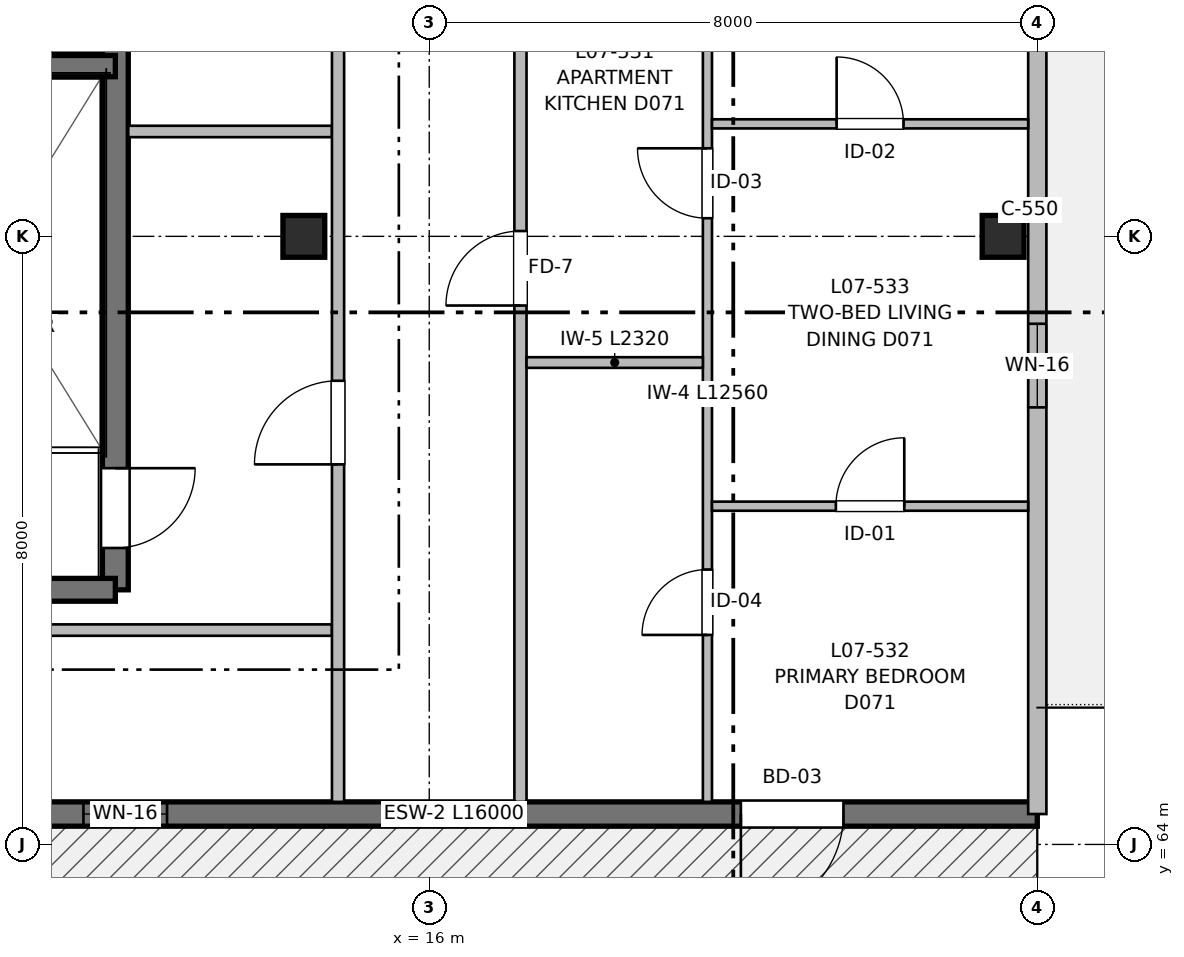
"""IFC4 building model, lengths in metres.
Left out: names, types, materials, properties, quantities, classifications, styles, units other than length and angle.
Written with IfcOpenShell. Run it as: python <this file> out.ifc"""

import sys

from ifc_helpers import new_model, si_unit, direction, frame, frame_2d, origin, origin_2d, place, context, subcontext, project, spatial, rectangle, extrude, element, fill, save


model = new_model("IFC4")
c1 = context("Model", 3, precision=1e-05, world=origin(), true_north=direction((0.0, 1.0)))
c2 = subcontext(c1, "Body", "Model", "MODEL_VIEW")
j1 = project(units=[si_unit("LENGTHUNIT", "METRE"), si_unit("PLANEANGLEUNIT", "RADIAN")], contexts=[c1])
p1 = place(None, origin())
s1 = spatial("IfcSite", under=j1, at=p1, CompositionType="ELEMENT")
p2 = place(p1, origin())
s2 = spatial("IfcBuilding", under=s1, at=p2, CompositionType="ELEMENT")
p3 = place(p2, frame((0.0, 0.0, 23.36)))
s3 = spatial("IfcBuildingStorey", under=s2, at=p3, CompositionType="ELEMENT", Elevation=23.36)
for number, where, z_axis, x_axis in (
    (1, (14.35, 72.0, 0.0), (0.0, 0.0, 1.0), (1.0, 0.0, 0.0)),
    (2, (23.55, 72.0, 0.0), (0.0, 0.0, 1.0), (1.0, 0.0, 0.0)),
):
    element("IfcColumn", number, at=place(p3, frame(where, z_axis=z_axis, x_axis=x_axis)), inside=s3, PredefinedType="COLUMN", context=c2, shape_type="SweptSolid", body=[
        extrude(rectangle(XDim=0.55, YDim=0.55, at=origin_2d()), origin(), (0.0, 0.0, 1.0), 3.2),
    ])
p4 = place(p3, frame((11.87, 79.8, 0.0), z_axis=(0.0, 0.0, 1.0), x_axis=(0.0, -1.0, 0.0)))
e3 = element("IfcWall", 3, at=p4, inside=s3, PredefinedType="SHEAR", context=c2, shape_type="SweptSolid", body=[
    extrude(rectangle(XDim=12.45, YDim=0.34, at=frame_2d((6.225, 0.0))), origin(), (0.0, 0.0, 1.0), 3.2),
])
p5 = place(p4, frame((10.85, 0.0, 0.0)))
e4 = element("IfcOpeningElement", 4, at=p5, cuts=e3, PredefinedType="OPENING", context=c2, shape_type="SweptSolid", body=[
    extrude(rectangle(XDim=1.05, YDim=2.15, at=frame_2d((0.525, 1.075))), frame((0.0, 0.18, 0.0), z_axis=(0.0, -1.0, 0.0), x_axis=(1.0, 0.0, 0.0)), (0.0, 0.0, 1.0), 0.36),
])
p6 = place(p3, frame((11.87, 67.35, 0.0), z_axis=(0.0, 0.0, 1.0), x_axis=(-1.0, 0.0, 0.0)))
e5 = element("IfcWall", 5, at=p6, inside=s3, PredefinedType="SHEAR", context=c2, shape_type="SweptSolid", body=[
    extrude(rectangle(XDim=3.41, YDim=0.3, at=frame_2d((1.705, 0.0))), origin(), (0.0, 0.0, 1.0), 3.2),
])
p7 = place(p3, frame((8.46, 74.24, 0.0), z_axis=(0.0, 0.0, 1.0), x_axis=(1.0, 0.0, 0.0)))
e6 = element("IfcWall", 6, at=p7, inside=s3, PredefinedType="SHEAR", context=c2, shape_type="SweptSolid", body=[
    extrude(rectangle(XDim=3.41, YDim=0.28, at=frame_2d((1.705, 0.0))), origin(), (0.0, 0.0, 1.0), 3.2),
])
p8 = place(p3, frame((24.0, 64.4, 0.0), z_axis=(0.0, 0.0, 1.0), x_axis=(-1.0, 0.0, 0.0)))
e7 = element("IfcWall", 7, at=p8, inside=s3, PredefinedType="SHEAR", context=c2, shape_type="SweptSolid", body=[
    extrude(rectangle(XDim=16.0, YDim=0.32, at=frame_2d((8.0, 0.0))), origin(), (0.0, 0.0, 1.0), 2.98),
])
p9 = place(p8, frame((2.55, 0.0, 0.0)))
e8 = element("IfcOpeningElement", 8, at=p9, cuts=e7, PredefinedType="OPENING", context=c2, shape_type="SweptSolid", body=[
    extrude(rectangle(XDim=1.35, YDim=2.2, at=frame_2d((0.675, 1.1))), frame((0.0, 0.17, 0.0), z_axis=(0.0, -1.0, 0.0), x_axis=(1.0, 0.0, 0.0)), (0.0, 0.0, 1.0), 0.34),
])
p10 = place(p8, frame((11.45, 0.0, 0.62)))
e9 = element("IfcOpeningElement", 9, at=p10, cuts=e7, PredefinedType="OPENING", context=c2, shape_type="SweptSolid", body=[
    extrude(rectangle(XDim=1.1, YDim=1.6, at=frame_2d((0.55, 0.8))), frame((0.0, 0.17, 0.0), z_axis=(0.0, -1.0, 0.0), x_axis=(1.0, 0.0, 0.0)), (0.0, 0.0, 1.0), 0.34),
])
p11 = place(p3, frame((24.0, 88.0, 0.0), z_axis=(0.0, 0.0, 1.0), x_axis=(0.0, -1.0, 0.0)))
e10 = element("IfcWall", 10, at=p11, inside=s3, PredefinedType="SOLIDWALL", context=c2, shape_type="SweptSolid", body=[
    extrude(rectangle(XDim=23.6, YDim=0.24, at=frame_2d((11.8, 0.0))), origin(), (0.0, 0.0, 1.0), 2.98),
])
p12 = place(p11, frame((5.3, 0.0, 0.0)))
e11 = element("IfcOpeningElement", 11, at=p12, cuts=e10, PredefinedType="OPENING", context=c2, shape_type="SweptSolid", body=[
    extrude(rectangle(XDim=1.2, YDim=2.2, at=frame_2d((0.6, 1.1))), frame((0.0, 0.13, 0.0), z_axis=(0.0, -1.0, 0.0), x_axis=(1.0, 0.0, 0.0)), (0.0, 0.0, 1.0), 0.26),
])
p13 = place(p11, frame((7.2, 0.0, 0.67)))
e12 = element("IfcOpeningElement", 12, at=p13, cuts=e10, PredefinedType="OPENING", context=c2, shape_type="SweptSolid", body=[
    extrude(rectangle(XDim=2.6, YDim=1.55, at=frame_2d((1.3, 0.775))), frame((0.0, 0.13, 0.0), z_axis=(0.0, -1.0, 0.0), x_axis=(1.0, 0.0, 0.0)), (0.0, 0.0, 1.0), 0.26),
])
p14 = place(p11, frame((17.15, 0.0, 0.62)))
e13 = element("IfcOpeningElement", 13, at=p14, cuts=e10, PredefinedType="OPENING", context=c2, shape_type="SweptSolid", body=[
    extrude(rectangle(XDim=1.1, YDim=1.6, at=frame_2d((0.55, 0.8))), frame((0.0, 0.13, 0.0), z_axis=(0.0, -1.0, 0.0), x_axis=(1.0, 0.0, 0.0)), (0.0, 0.0, 1.0), 0.26),
])
p15 = place(p11, frame((11.925, 0.0, 0.82)))
e14 = element("IfcOpeningElement", 14, at=p15, cuts=e10, PredefinedType="OPENING", context=c2, shape_type="SweptSolid", body=[
    extrude(rectangle(XDim=1.5, YDim=1.4, at=frame_2d((0.75, 0.7))), frame((0.0, 0.13, 0.0), z_axis=(0.0, -1.0, 0.0), x_axis=(1.0, 0.0, 0.0)), (0.0, 0.0, 1.0), 0.26),
])
p16 = place(p3, frame((8.12, 66.82, 0.0), z_axis=(0.0, 0.0, 1.0), x_axis=(1.0, 0.0, 0.0)))
e15 = element("IfcWall", 15, at=p16, inside=s3, PredefinedType="PARTITIONING", context=c2, shape_type="SweptSolid", body=[
    extrude(rectangle(XDim=6.6, YDim=0.15, at=frame_2d((3.3, 0.0))), origin(), (0.0, 0.0, 1.0), 2.935),
])
p17 = place(p3, frame((12.04, 73.38, 0.0), z_axis=(0.0, 0.0, 1.0), x_axis=(1.0, 0.0, 0.0)))
e16 = element("IfcWall", 16, at=p17, inside=s3, PredefinedType="PARTITIONING", context=c2, shape_type="SweptSolid", body=[
    extrude(rectangle(XDim=2.68, YDim=0.15, at=frame_2d((1.34, 0.0))), origin(), (0.0, 0.0, 1.0), 2.935),
])
p18 = place(p3, frame((14.8, 64.56, 0.0), z_axis=(0.0, 0.0, 1.0), x_axis=(0.0, 1.0, 0.0)))
e17 = element("IfcWall", 17, at=p18, inside=s3, PredefinedType="PARTITIONING", context=c2, shape_type="SweptSolid", body=[
    extrude(rectangle(XDim=42.24, YDim=0.16, at=frame_2d((21.12, 0.0))), origin(), (0.0, 0.0, 1.0), 2.935),
])
p19 = place(p18, frame((4.44, 0.0, 0.0)))
e18 = element("IfcOpeningElement", 18, at=p19, cuts=e17, PredefinedType="OPENING", context=c2, shape_type="SweptSolid", body=[
    extrude(rectangle(XDim=1.1, YDim=2.15, at=frame_2d((0.55, 1.075))), frame((0.0, 0.09, 0.0), z_axis=(0.0, -1.0, 0.0), x_axis=(1.0, 0.0, 0.0)), (0.0, 0.0, 1.0), 0.18),
])
p20 = place(p18, frame((10.84, 0.0, 0.0)))
e19 = element("IfcOpeningElement", 19, at=p20, cuts=e17, PredefinedType="OPENING", context=c2, shape_type="SweptSolid", body=[
    extrude(rectangle(XDim=1.6, YDim=2.15, at=frame_2d((0.8, 1.075))), frame((0.0, 0.09, 0.0), z_axis=(0.0, -1.0, 0.0), x_axis=(1.0, 0.0, 0.0)), (0.0, 0.0, 1.0), 0.18),
])
p21 = place(p18, frame((24.345, 0.0, 0.0)))
e20 = element("IfcOpeningElement", 20, at=p21, cuts=e17, PredefinedType="OPENING", context=c2, shape_type="SweptSolid", body=[
    extrude(rectangle(XDim=0.98, YDim=2.15, at=frame_2d((0.49, 1.075))), frame((0.0, 0.09, 0.0), z_axis=(0.0, -1.0, 0.0), x_axis=(1.0, 0.0, 0.0)), (0.0, 0.0, 1.0), 0.18),
])
p22 = place(p18, frame((32.555, 0.0, 0.0)))
e21 = element("IfcOpeningElement", 21, at=p22, cuts=e17, PredefinedType="OPENING", context=c2, shape_type="SweptSolid", body=[
    extrude(rectangle(XDim=0.98, YDim=2.15, at=frame_2d((0.49, 1.075))), frame((0.0, 0.09, 0.0), z_axis=(0.0, -1.0, 0.0), x_axis=(1.0, 0.0, 0.0)), (0.0, 0.0, 1.0), 0.18),
])
p23 = place(p3, frame((17.2, 64.56, 0.0), z_axis=(0.0, 0.0, 1.0), x_axis=(0.0, 1.0, 0.0)))
e22 = element("IfcWall", 22, at=p23, inside=s3, PredefinedType="PARTITIONING", context=c2, shape_type="SweptSolid", body=[
    extrude(rectangle(XDim=42.24, YDim=0.16, at=frame_2d((21.12, 0.0))), origin(), (0.0, 0.0, 1.0), 2.935),
])
p24 = place(p23, frame((6.53, 0.0, 0.0)))
e23 = element("IfcOpeningElement", 23, at=p24, cuts=e22, PredefinedType="OPENING", context=c2, shape_type="SweptSolid", body=[
    extrude(rectangle(XDim=0.98, YDim=2.15, at=frame_2d((0.49, 1.075))), frame((0.0, 0.09, 0.0), z_axis=(0.0, -1.0, 0.0), x_axis=(1.0, 0.0, 0.0)), (0.0, 0.0, 1.0), 0.18),
])
p25 = place(p23, frame((18.84, 0.0, 0.0)))
e24 = element("IfcOpeningElement", 24, at=p25, cuts=e22, PredefinedType="OPENING", context=c2, shape_type="SweptSolid", body=[
    extrude(rectangle(XDim=1.02, YDim=2.15, at=frame_2d((0.51, 1.075))), frame((0.0, 0.09, 0.0), z_axis=(0.0, -1.0, 0.0), x_axis=(1.0, 0.0, 0.0)), (0.0, 0.0, 1.0), 0.18),
])
p26 = place(p23, frame((29.86, 0.0, 0.0)))
e25 = element("IfcOpeningElement", 25, at=p26, cuts=e22, PredefinedType="OPENING", context=c2, shape_type="SweptSolid", body=[
    extrude(rectangle(XDim=0.98, YDim=2.15, at=frame_2d((0.49, 1.075))), frame((0.0, 0.09, 0.0), z_axis=(0.0, -1.0, 0.0), x_axis=(1.0, 0.0, 0.0)), (0.0, 0.0, 1.0), 0.18),
])
p27 = place(p23, frame((38.86, 0.0, 0.0)))
e26 = element("IfcOpeningElement", 26, at=p27, cuts=e22, PredefinedType="OPENING", context=c2, shape_type="SweptSolid", body=[
    extrude(rectangle(XDim=0.98, YDim=2.15, at=frame_2d((0.49, 1.075))), frame((0.0, 0.09, 0.0), z_axis=(0.0, -1.0, 0.0), x_axis=(1.0, 0.0, 0.0)), (0.0, 0.0, 1.0), 0.18),
])
p28 = place(p3, frame((19.66, 64.56, 0.0), z_axis=(0.0, 0.0, 1.0), x_axis=(0.0, 1.0, 0.0)))
e27 = element("IfcWall", 27, at=p28, inside=s3, PredefinedType="PARTITIONING", context=c2, shape_type="SweptSolid", body=[
    extrude(rectangle(XDim=12.56, YDim=0.12, at=frame_2d((6.28, 0.0))), origin(), (0.0, 0.0, 1.0), 2.935),
])
p29 = place(p28, frame((2.196, 0.0, 0.0)))
e28 = element("IfcOpeningElement", 28, at=p29, cuts=e27, PredefinedType="OPENING", context=c2, shape_type="SweptSolid", body=[
    extrude(rectangle(XDim=0.86, YDim=2.1, at=frame_2d((0.43, 1.05))), frame((0.0, 0.07, 0.0), z_axis=(0.0, -1.0, 0.0), x_axis=(1.0, 0.0, 0.0)), (0.0, 0.0, 1.0), 0.14),
])
p30 = place(p28, frame((7.678, 0.0, 0.0)))
e29 = element("IfcOpeningElement", 29, at=p30, cuts=e27, PredefinedType="OPENING", context=c2, shape_type="SweptSolid", body=[
    extrude(rectangle(XDim=0.92, YDim=2.1, at=frame_2d((0.46, 1.05))), frame((0.0, 0.07, 0.0), z_axis=(0.0, -1.0, 0.0), x_axis=(1.0, 0.0, 0.0)), (0.0, 0.0, 1.0), 0.14),
])
p31 = place(p3, frame((17.28, 70.34, 0.0), z_axis=(0.0, 0.0, 1.0), x_axis=(1.0, 0.0, 0.0)))
e30 = element("IfcWall", 30, at=p31, inside=s3, PredefinedType="PARTITIONING", context=c2, shape_type="SweptSolid", body=[
    extrude(rectangle(XDim=2.32, YDim=0.14, at=frame_2d((1.16, 0.0))), origin(), (0.0, 0.0, 1.0), 2.935),
])
p32 = place(p3, frame((19.72, 68.45, 0.0), z_axis=(0.0, 0.0, 1.0), x_axis=(1.0, 0.0, 0.0)))
e31 = element("IfcWall", 31, at=p32, inside=s3, PredefinedType="PARTITIONING", context=c2, shape_type="SweptSolid", body=[
    extrude(rectangle(XDim=4.16, YDim=0.12, at=frame_2d((2.08, 0.0))), origin(), (0.0, 0.0, 1.0), 2.935),
])
p33 = place(p32, frame((1.63, 0.0, 0.0)))
e32 = element("IfcOpeningElement", 32, at=p33, cuts=e31, PredefinedType="OPENING", context=c2, shape_type="SweptSolid", body=[
    extrude(rectangle(XDim=0.9, YDim=2.1, at=frame_2d((0.45, 1.05))), frame((0.0, 0.07, 0.0), z_axis=(0.0, -1.0, 0.0), x_axis=(1.0, 0.0, 0.0)), (0.0, 0.0, 1.0), 0.14),
])
p34 = place(p3, frame((19.72, 73.48, 0.0), z_axis=(0.0, 0.0, 1.0), x_axis=(1.0, 0.0, 0.0)))
e33 = element("IfcWall", 33, at=p34, inside=s3, PredefinedType="PARTITIONING", context=c2, shape_type="SweptSolid", body=[
    extrude(rectangle(XDim=4.16, YDim=0.12, at=frame_2d((2.08, 0.0))), origin(), (0.0, 0.0, 1.0), 2.935),
])
p35 = place(p34, frame((1.64, 0.0, 0.0)))
e34 = element("IfcOpeningElement", 34, at=p35, cuts=e33, PredefinedType="OPENING", context=c2, shape_type="SweptSolid", body=[
    extrude(rectangle(XDim=0.88, YDim=2.1, at=frame_2d((0.44, 1.05))), frame((0.0, 0.07, 0.0), z_axis=(0.0, -1.0, 0.0), x_axis=(1.0, 0.0, 0.0)), (0.0, 0.0, 1.0), 0.14),
])
p36 = place(p5, origin())
e35 = element("IfcDoor", 35, at=p36, inside=s3, OperationType="SINGLE_SWING_LEFT", PredefinedType="DOOR", context=c2, shape_type="SweptSolid", body=[
    extrude(rectangle(XDim=1.05, YDim=2.15, at=frame_2d((0.525, 1.075))), frame((0.0, 0.025, 0.0), z_axis=(0.0, -1.0, 0.0), x_axis=(1.0, 0.0, 0.0)), (0.0, 0.0, 1.0), 0.05),
])
fill(e4, e35)
p37 = place(p9, origin())
e36 = element("IfcDoor", 36, at=p37, inside=s3, OperationType="SINGLE_SWING_RIGHT", PredefinedType="DOOR", context=c2, shape_type="SweptSolid", body=[
    extrude(rectangle(XDim=1.35, YDim=2.2, at=frame_2d((0.675, 1.1))), frame((0.0, 0.025, 0.0), z_axis=(0.0, -1.0, 0.0), x_axis=(1.0, 0.0, 0.0)), (0.0, 0.0, 1.0), 0.05),
])
fill(e8, e36)
p38 = place(p10, origin())
e37 = element("IfcWindow", 37, at=p38, inside=s3, PartitioningType="SINGLE_PANEL", PredefinedType="WINDOW", context=c2, shape_type="SweptSolid", body=[
    extrude(rectangle(XDim=1.1, YDim=1.6, at=frame_2d((0.55, 0.8))), frame((0.0, 0.03, 0.0), z_axis=(0.0, -1.0, 0.0), x_axis=(1.0, 0.0, 0.0)), (0.0, 0.0, 1.0), 0.06),
])
fill(e9, e37)
p39 = place(p14, origin())
e38 = element("IfcWindow", 38, at=p39, inside=s3, PartitioningType="SINGLE_PANEL", PredefinedType="WINDOW", context=c2, shape_type="SweptSolid", body=[
    extrude(rectangle(XDim=1.1, YDim=1.6, at=frame_2d((0.55, 0.8))), frame((0.0, 0.03, 0.0), z_axis=(0.0, -1.0, 0.0), x_axis=(1.0, 0.0, 0.0)), (0.0, 0.0, 1.0), 0.06),
])
fill(e13, e38)
p40 = place(p19, origin())
e39 = element("IfcDoor", 39, at=p40, inside=s3, OperationType="SINGLE_SWING_LEFT", PredefinedType="DOOR", context=c2, shape_type="SweptSolid", body=[
    extrude(rectangle(XDim=1.1, YDim=2.15, at=frame_2d((0.55, 1.075))), frame((0.0, 0.025, 0.0), z_axis=(0.0, -1.0, 0.0), x_axis=(1.0, 0.0, 0.0)), (0.0, 0.0, 1.0), 0.05),
])
fill(e18, e39)
p41 = place(p29, origin())
e40 = element("IfcDoor", 40, at=p41, inside=s3, OperationType="SINGLE_SWING_LEFT", PredefinedType="DOOR", context=c2, shape_type="SweptSolid", body=[
    extrude(rectangle(XDim=0.86, YDim=2.1, at=frame_2d((0.43, 1.05))), frame((0.0, 0.025, 0.0), z_axis=(0.0, -1.0, 0.0), x_axis=(1.0, 0.0, 0.0)), (0.0, 0.0, 1.0), 0.05),
])
fill(e28, e40)
p42 = place(p30, origin())
e41 = element("IfcDoor", 41, at=p42, inside=s3, OperationType="SINGLE_SWING_RIGHT", PredefinedType="DOOR", context=c2, shape_type="SweptSolid", body=[
    extrude(rectangle(XDim=0.92, YDim=2.1, at=frame_2d((0.46, 1.05))), frame((0.0, 0.025, 0.0), z_axis=(0.0, -1.0, 0.0), x_axis=(1.0, 0.0, 0.0)), (0.0, 0.0, 1.0), 0.05),
])
fill(e29, e41)
p43 = place(p24, origin())
e42 = element("IfcDoor", 42, at=p43, inside=s3, OperationType="SINGLE_SWING_LEFT", PredefinedType="DOOR", context=c2, shape_type="SweptSolid", body=[
    extrude(rectangle(XDim=0.98, YDim=2.15, at=frame_2d((0.49, 1.075))), frame((0.0, 0.025, 0.0), z_axis=(0.0, -1.0, 0.0), x_axis=(1.0, 0.0, 0.0)), (0.0, 0.0, 1.0), 0.05),
])
fill(e23, e42)
p44 = place(p33, origin())
e43 = element("IfcDoor", 43, at=p44, inside=s3, OperationType="SINGLE_SWING_RIGHT", PredefinedType="DOOR", context=c2, shape_type="SweptSolid", body=[
    extrude(rectangle(XDim=0.9, YDim=2.1, at=frame_2d((0.45, 1.05))), frame((0.0, 0.025, 0.0), z_axis=(0.0, -1.0, 0.0), x_axis=(1.0, 0.0, 0.0)), (0.0, 0.0, 1.0), 0.05),
])
fill(e32, e43)
p45 = place(p35, origin())
e44 = element("IfcDoor", 44, at=p45, inside=s3, OperationType="SINGLE_SWING_LEFT", PredefinedType="DOOR", context=c2, shape_type="SweptSolid", body=[
    extrude(rectangle(XDim=0.88, YDim=2.1, at=frame_2d((0.44, 1.05))), frame((0.0, 0.025, 0.0), z_axis=(0.0, -1.0, 0.0), x_axis=(1.0, 0.0, 0.0)), (0.0, 0.0, 1.0), 0.05),
])
fill(e34, e44)
save(model, sys.argv[1])
